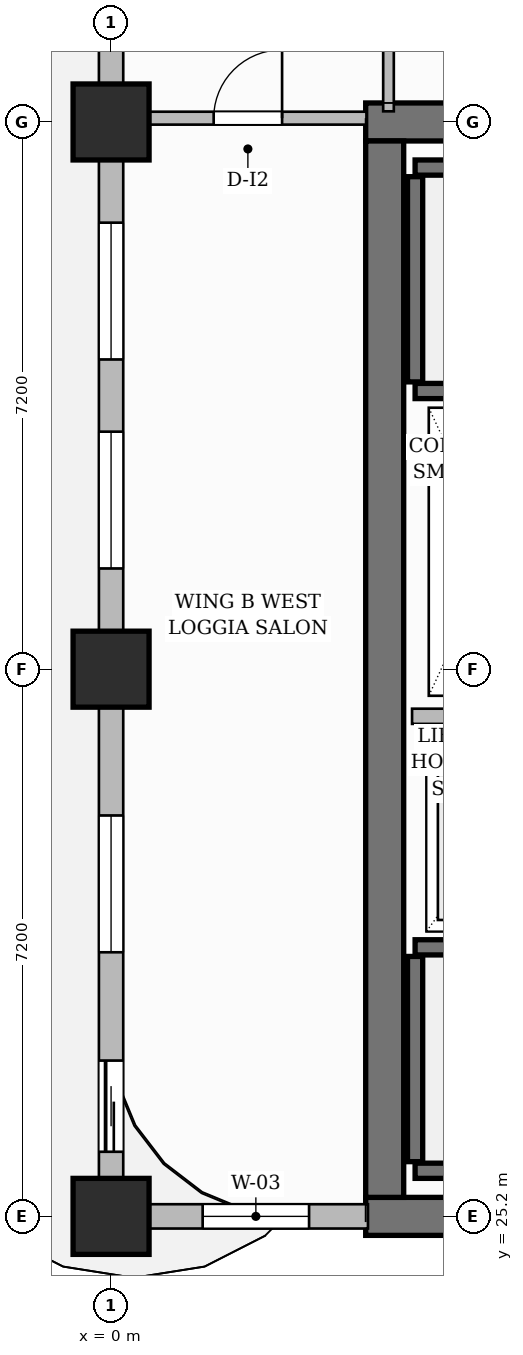
"""IFC4 building model, lengths in metres.
Left out: names, types, materials, properties, quantities, classifications, styles, units other than length and angle.
Written with IfcOpenShell. Run it as: python <this file> out.ifc"""

import sys

from ifc_helpers import new_model, si_unit, direction, frame, frame_2d, origin, origin_2d, place, context, subcontext, project, spatial, rectangle, extrude, source, transform, mapped, element, fill, save


model = new_model("IFC4")
c1 = context("Model", 3, precision=1e-05, world=origin(), true_north=direction((0.0, 1.0)))
c2 = subcontext(c1, "Body", "Model", "MODEL_VIEW")
j1 = project(units=[si_unit("LENGTHUNIT", "METRE"), si_unit("PLANEANGLEUNIT", "RADIAN")], contexts=[c1])
p1 = place(None, origin())
s1 = spatial("IfcSite", under=j1, at=p1, CompositionType="ELEMENT")
p2 = place(p1, origin())
s2 = spatial("IfcBuilding", under=s1, at=p2, CompositionType="ELEMENT")
p3 = place(p2, frame((0.0, 0.0, 145.1)))
s3 = spatial("IfcBuildingStorey", under=s2, at=p3, CompositionType="ELEMENT", Elevation=145.1)
for number, where, z_axis, x_axis in (
    (1, (3.35, 25.2, 0.0), (0.0, 0.0, 1.0), (1.0, 0.0, 0.0)),
    (2, (3.35, 39.6, 0.0), (0.0, 0.0, 1.0), (1.0, 0.0, 0.0)),
):
    element("IfcWall", number, at=place(p3, frame(where, z_axis=z_axis, x_axis=x_axis)), inside=s3, PredefinedType="SHEAR", context=c2, shape_type="SweptSolid", body=[
        extrude(rectangle(XDim=8.3, YDim=0.5, at=frame_2d((4.15, 0.0))), origin(), (0.0, 0.0, 1.0), 5.2),
    ])
p4 = place(p3, frame((3.6, 25.45, 0.0), z_axis=(0.0, 0.0, 1.0), x_axis=(0.0, 1.0, 0.0)))
e3 = element("IfcWall", 3, at=p4, inside=s3, PredefinedType="SHEAR", context=c2, shape_type="SweptSolid", body=[
    extrude(rectangle(XDim=13.9, YDim=0.5, at=frame_2d((6.95, 0.0))), origin(), (0.0, 0.0, 1.0), 5.2),
])
m1 = source(origin(), c2, "Body", "SweptSolid", [
    extrude(rectangle(XDim=1.0, YDim=1.0, at=origin_2d()), origin(), (0.0, 0.0, 1.0), 5.2),
])
for number, where, z_axis, x_axis in (
    (4, (0.0, 25.2, 0.0), (0.0, 0.0, 1.0), (1.0, 0.0, 0.0)),
    (5, (0.0, 32.4, 0.0), (0.0, 0.0, 1.0), (1.0, 0.0, 0.0)),
    (6, (0.0, 39.6, 0.0), (0.0, 0.0, 1.0), (1.0, 0.0, 0.0)),
):
    element("IfcColumn", number, at=place(p3, frame(where, z_axis=z_axis, x_axis=x_axis)), inside=s3, PredefinedType="COLUMN", context=c2, shape_type="MappedRepresentation", body=[
        mapped(m1, transform((0.0, 0.0, 0.0), scale=1.0)),
    ])
p5 = place(p3, frame((4.0, 25.8, 0.0), z_axis=(0.0, 0.0, 1.0), x_axis=(1.0, 0.0, 0.0)))
e7 = element("IfcWall", 7, at=p5, inside=s3, PredefinedType="SHEAR", context=c2, shape_type="SweptSolid", body=[
    extrude(rectangle(XDim=7.1, YDim=0.2, at=frame_2d((3.55, 0.0))), origin(), (0.0, 0.0, 1.0), 5.2),
])
p6 = place(p3, frame((4.0, 25.92, 0.0), z_axis=(0.0, 0.0, 1.0), x_axis=(0.0, 1.0, 0.0)))
e8 = element("IfcWall", 8, at=p6, inside=s3, PredefinedType="SHEAR", context=c2, shape_type="SweptSolid", body=[
    extrude(rectangle(XDim=2.7, YDim=0.2, at=frame_2d((1.35, 0.0))), origin(), (0.0, 0.0, 1.0), 5.2),
])
p7 = place(p3, frame((4.0, 28.74, 0.0), z_axis=(0.0, 0.0, 1.0), x_axis=(1.0, 0.0, 0.0)))
e9 = element("IfcWall", 9, at=p7, inside=s3, PredefinedType="SHEAR", context=c2, shape_type="SweptSolid", body=[
    extrude(rectangle(XDim=7.1, YDim=0.2, at=frame_2d((3.55, 0.0))), origin(), (0.0, 0.0, 1.0), 5.2),
])
p8 = place(p7, frame((5.815, 0.0, 0.0)))
e10 = element("IfcOpeningElement", 10, at=p8, cuts=e9, PredefinedType="OPENING", context=c2, shape_type="SweptSolid", body=[
    extrude(rectangle(XDim=1.05, YDim=2.2, at=frame_2d((0.525, 1.1))), frame((0.0, 0.11, 0.0), z_axis=(0.0, -1.0, 0.0), x_axis=(1.0, 0.0, 0.0)), (0.0, 0.0, 1.0), 0.22),
])
p9 = place(p3, frame((4.0, 39.0, 0.0), z_axis=(0.0, 0.0, 1.0), x_axis=(1.0, 0.0, 0.0)))
e11 = element("IfcWall", 11, at=p9, inside=s3, PredefinedType="SHEAR", context=c2, shape_type="SweptSolid", body=[
    extrude(rectangle(XDim=7.1, YDim=0.2, at=frame_2d((3.55, 0.0))), origin(), (0.0, 0.0, 1.0), 5.2),
])
p10 = place(p3, frame((4.0, 36.18, 0.0), z_axis=(0.0, 0.0, 1.0), x_axis=(0.0, 1.0, 0.0)))
e12 = element("IfcWall", 12, at=p10, inside=s3, PredefinedType="SHEAR", context=c2, shape_type="SweptSolid", body=[
    extrude(rectangle(XDim=2.7, YDim=0.2, at=frame_2d((1.35, 0.0))), origin(), (0.0, 0.0, 1.0), 5.2),
])
p11 = place(p3, frame((4.0, 36.06, 0.0), z_axis=(0.0, 0.0, 1.0), x_axis=(1.0, 0.0, 0.0)))
e13 = element("IfcWall", 13, at=p11, inside=s3, PredefinedType="SHEAR", context=c2, shape_type="SweptSolid", body=[
    extrude(rectangle(XDim=7.1, YDim=0.2, at=frame_2d((3.55, 0.0))), origin(), (0.0, 0.0, 1.0), 5.2),
])
p12 = place(p11, frame((5.815, 0.0, 0.0)))
e14 = element("IfcOpeningElement", 14, at=p12, cuts=e13, PredefinedType="OPENING", context=c2, shape_type="SweptSolid", body=[
    extrude(rectangle(XDim=1.05, YDim=2.2, at=frame_2d((0.525, 1.1))), frame((0.0, 0.11, 0.0), z_axis=(0.0, -1.0, 0.0), x_axis=(1.0, 0.0, 0.0)), (0.0, 0.0, 1.0), 0.22),
])
p13 = place(p3, frame((3.96, 31.78, 0.0), z_axis=(0.0, 0.0, 1.0), x_axis=(1.0, 0.0, 0.0)))
e15 = element("IfcWall", 15, at=p13, inside=s3, PredefinedType="PARTITIONING", context=c2, shape_type="SweptSolid", body=[
    extrude(rectangle(XDim=2.13, YDim=0.2, at=frame_2d((1.065, 0.0))), origin(), (0.0, 0.0, 1.0), 4.95),
])
p14 = place(p3, frame((0.24, 39.65, 0.0), z_axis=(0.0, 0.0, 1.0), x_axis=(1.0, 0.0, 0.0)))
e16 = element("IfcWall", 16, at=p14, inside=s3, PredefinedType="PARTITIONING", context=c2, shape_type="SweptSolid", body=[
    extrude(rectangle(XDim=3.12, YDim=0.17, at=frame_2d((1.56, 0.0))), origin(), (0.0, 0.0, 1.0), 4.95),
])
p15 = place(p14, frame((1.11, 0.0, 0.0)))
e17 = element("IfcOpeningElement", 17, at=p15, cuts=e16, PredefinedType="OPENING", context=c2, shape_type="SweptSolid", body=[
    extrude(rectangle(XDim=0.9, YDim=2.15, at=frame_2d((0.45, 1.075))), frame((0.0, 0.095, 0.0), z_axis=(0.0, -1.0, 0.0), x_axis=(1.0, 0.0, 0.0)), (0.0, 0.0, 1.0), 0.19),
])
p16 = place(p3, frame((3.65, 39.74, 0.0), z_axis=(0.0, 0.0, 1.0), x_axis=(0.0, 1.0, 0.0)))
e18 = element("IfcWall", 18, at=p16, inside=s3, PredefinedType="PARTITIONING", context=c2, shape_type="SweptSolid", body=[
    extrude(rectangle(XDim=1.745, YDim=0.14, at=frame_2d((0.873, 0.0))), origin(), (0.0, 0.0, 1.0), 4.95),
])
p17 = place(p3, frame((0.0, 25.2, 0.0), z_axis=(0.0, 0.0, 1.0), x_axis=(1.0, 0.0, 0.0)))
e19 = element("IfcWall", 19, at=p17, inside=s3, PredefinedType="SOLIDWALL", context=c2, shape_type="SweptSolid", body=[
    extrude(rectangle(XDim=3.38, YDim=0.32, at=frame_2d((1.69, 0.0))), origin(), (0.0, 0.0, 1.0), 4.95),
])
p18 = place(p17, frame((1.205, 0.0, 0.8)))
e20 = element("IfcOpeningElement", 20, at=p18, cuts=e19, PredefinedType="OPENING", context=c2, shape_type="SweptSolid", body=[
    extrude(rectangle(XDim=1.4, YDim=1.85, at=frame_2d((0.7, 0.925))), frame((0.0, 0.17, 0.0), z_axis=(0.0, -1.0, 0.0), x_axis=(1.0, 0.0, 0.0)), (0.0, 0.0, 1.0), 0.34),
])
p19 = place(p3, frame((0.0, 25.25, 0.0), z_axis=(0.0, 0.0, 1.0), x_axis=(0.0, 1.0, 0.0)))
e21 = element("IfcWall", 21, at=p19, inside=s3, PredefinedType="SOLIDWALL", context=c2, shape_type="SweptSolid", body=[
    extrude(rectangle(XDim=21.5, YDim=0.32, at=frame_2d((10.75, 0.0))), origin(), (0.0, 0.0, 1.0), 4.335),
])
p20 = place(p19, frame((18.607, 0.0, 0.0)))
e22 = element("IfcOpeningElement", 22, at=p20, cuts=e21, PredefinedType="OPENING", context=c2, shape_type="SweptSolid", body=[
    extrude(rectangle(XDim=1.2, YDim=2.2, at=frame_2d((0.6, 1.1))), frame((0.0, 0.17, 0.0), z_axis=(0.0, -1.0, 0.0), x_axis=(1.0, 0.0, 0.0)), (0.0, 0.0, 1.0), 0.34),
])
p21 = place(p19, frame((0.8, 0.0, 0.0)))
e23 = element("IfcOpeningElement", 23, at=p21, cuts=e21, PredefinedType="OPENING", context=c2, shape_type="SweptSolid", body=[
    extrude(rectangle(XDim=1.2, YDim=2.2, at=frame_2d((0.6, 1.1))), frame((0.0, 0.17, 0.0), z_axis=(0.0, -1.0, 0.0), x_axis=(1.0, 0.0, 0.0)), (0.0, 0.0, 1.0), 0.34),
])
p22 = place(p19, frame((3.425, 0.0, 0.8)))
e24 = element("IfcOpeningElement", 24, at=p22, cuts=e21, PredefinedType="OPENING", context=c2, shape_type="SweptSolid", body=[
    extrude(rectangle(XDim=1.8, YDim=1.85, at=frame_2d((0.9, 0.925))), frame((0.0, 0.17, 0.0), z_axis=(0.0, -1.0, 0.0), x_axis=(1.0, 0.0, 0.0)), (0.0, 0.0, 1.0), 0.34),
])
p23 = place(p19, frame((8.475, 0.0, 0.8)))
e25 = element("IfcOpeningElement", 25, at=p23, cuts=e21, PredefinedType="OPENING", context=c2, shape_type="SweptSolid", body=[
    extrude(rectangle(XDim=1.8, YDim=1.85, at=frame_2d((0.9, 0.925))), frame((0.0, 0.17, 0.0), z_axis=(0.0, -1.0, 0.0), x_axis=(1.0, 0.0, 0.0)), (0.0, 0.0, 1.0), 0.34),
])
p24 = place(p19, frame((11.225, 0.0, 0.8)))
e26 = element("IfcOpeningElement", 26, at=p24, cuts=e21, PredefinedType="OPENING", context=c2, shape_type="SweptSolid", body=[
    extrude(rectangle(XDim=1.8, YDim=1.85, at=frame_2d((0.9, 0.925))), frame((0.0, 0.17, 0.0), z_axis=(0.0, -1.0, 0.0), x_axis=(1.0, 0.0, 0.0)), (0.0, 0.0, 1.0), 0.34),
])
p25 = place(p19, frame((15.621, 0.0, 0.8)))
e27 = element("IfcOpeningElement", 27, at=p25, cuts=e21, PredefinedType="OPENING", context=c2, shape_type="SweptSolid", body=[
    extrude(rectangle(XDim=1.8, YDim=1.85, at=frame_2d((0.9, 0.925))), frame((0.0, 0.17, 0.0), z_axis=(0.0, -1.0, 0.0), x_axis=(1.0, 0.0, 0.0)), (0.0, 0.0, 1.0), 0.34),
])
m2 = source(origin(), c2, "Body", "SweptSolid", [
    extrude(rectangle(XDim=0.9, YDim=2.15, at=frame_2d((0.45, 1.075))), frame((0.0, 0.025, 0.0), z_axis=(0.0, -1.0, 0.0), x_axis=(1.0, 0.0, 0.0)), (0.0, 0.0, 1.0), 0.05),
])
p26 = place(p15, origin())
e28 = element("IfcDoor", 28, at=p26, inside=s3, OperationType="SINGLE_SWING_RIGHT", PredefinedType="DOOR", context=c2, shape_type="MappedRepresentation", body=[
    mapped(m2, transform((0.0, 0.0, 0.0), scale=1.0)),
])
fill(e17, e28)
m3 = source(origin(), c2, "Body", "SweptSolid", [
    extrude(rectangle(XDim=1.2, YDim=2.2, at=frame_2d((0.6, 1.1))), frame((0.0, 0.025, 0.0), z_axis=(0.0, -1.0, 0.0), x_axis=(1.0, 0.0, 0.0)), (0.0, 0.0, 1.0), 0.05),
])
p27 = place(p21, origin())
e29 = element("IfcDoor", 29, at=p27, inside=s3, OperationType="SLIDING_TO_LEFT", PredefinedType="DOOR", context=c2, shape_type="MappedRepresentation", body=[
    mapped(m3, transform((0.0, 0.0, 0.0), scale=1.0)),
])
fill(e23, e29)
m4 = source(origin(), c2, "Body", "SweptSolid", [
    extrude(rectangle(XDim=1.4, YDim=1.85, at=frame_2d((0.7, 0.925))), frame((0.0, 0.03, 0.0), z_axis=(0.0, -1.0, 0.0), x_axis=(1.0, 0.0, 0.0)), (0.0, 0.0, 1.0), 0.06),
])
p28 = place(p18, origin())
e30 = element("IfcWindow", 30, at=p28, inside=s3, PartitioningType="SINGLE_PANEL", PredefinedType="WINDOW", context=c2, shape_type="MappedRepresentation", body=[
    mapped(m4, transform((0.0, 0.0, 0.0), scale=1.0)),
])
fill(e20, e30)
m5 = source(origin(), c2, "Body", "SweptSolid", [
    extrude(rectangle(XDim=1.8, YDim=1.85, at=frame_2d((0.9, 0.925))), frame((0.0, 0.03, 0.0), z_axis=(0.0, -1.0, 0.0), x_axis=(1.0, 0.0, 0.0)), (0.0, 0.0, 1.0), 0.06),
])
p29 = place(p22, origin())
e31 = element("IfcWindow", 31, at=p29, inside=s3, PartitioningType="DOUBLE_PANEL_VERTICAL", PredefinedType="WINDOW", context=c2, shape_type="MappedRepresentation", body=[
    mapped(m5, transform((0.0, 0.0, 0.0), scale=1.0)),
])
fill(e24, e31)
p30 = place(p23, origin())
e32 = element("IfcWindow", 32, at=p30, inside=s3, PartitioningType="DOUBLE_PANEL_VERTICAL", PredefinedType="WINDOW", context=c2, shape_type="MappedRepresentation", body=[
    mapped(m5, transform((0.0, 0.0, 0.0), scale=1.0)),
])
fill(e25, e32)
p31 = place(p24, origin())
e33 = element("IfcWindow", 33, at=p31, inside=s3, PartitioningType="DOUBLE_PANEL_VERTICAL", PredefinedType="WINDOW", context=c2, shape_type="MappedRepresentation", body=[
    mapped(m5, transform((0.0, 0.0, 0.0), scale=1.0)),
])
fill(e26, e33)
save(model, sys.argv[1])
